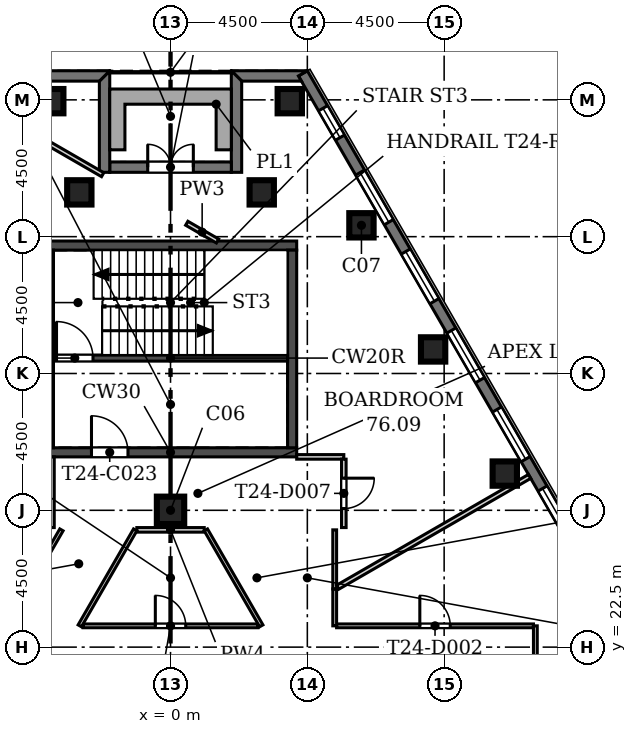
"""IFC4 building model, lengths in metres.
Left out: names, types, materials, properties, quantities, classifications, styles, units other than length and angle.
Written with IfcOpenShell. Run it as: python <this file> out.ifc"""

import sys

from ifc_helpers import new_model, si_unit, direction, frame, frame_2d, origin, origin_2d, place, context, subcontext, project, spatial, polyline, rectangle, outline, extrude, element, fill, save


model = new_model("IFC4")
c1 = context("Model", 3, precision=1e-05, world=origin(), true_north=direction((0.0, 1.0)))
c2 = subcontext(c1, "Body", "Model", "MODEL_VIEW")
j1 = project(units=[si_unit("LENGTHUNIT", "METRE"), si_unit("PLANEANGLEUNIT", "RADIAN")], contexts=[c1])
p1 = place(None, origin())
s1 = spatial("IfcSite", under=j1, at=p1, CompositionType="ELEMENT")
p2 = place(p1, origin())
s2 = spatial("IfcBuilding", under=s1, at=p2, CompositionType="ELEMENT")
p3 = place(p2, frame((0.0, 0.0, 335.1)))
s3 = spatial("IfcBuildingStorey", under=s2, at=p3, CompositionType="ELEMENT", Elevation=335.1)
for number, where, z_axis, x_axis in (
    (1, (10.994, 28.208, 0.0), (0.0, 0.0, 1.0), (1.0, 0.0, 0.0)),
    (2, (8.637, 32.291, 0.0), (0.0, 0.0, 1.0), (1.0, 0.0, 0.0)),
    (3, (6.28, 36.374, 0.0), (0.0, 0.0, 1.0), (1.0, 0.0, 0.0)),
    (4, (3.923, 40.457, 0.0), (0.0, 0.0, 1.0), (1.0, 0.0, 0.0)),
    (5, (3.0, 37.457, 0.0), (0.0, 0.0, 1.0), (1.0, 0.0, 0.0)),
    (6, (-3.0, 37.457, 0.0), (0.0, 0.0, 1.0), (1.0, 0.0, 0.0)),
    (7, (-3.923, 40.457, 0.0), (0.0, 0.0, 1.0), (1.0, 0.0, 0.0)),
):
    element("IfcColumn", number, at=place(p3, frame(where, z_axis=z_axis, x_axis=x_axis)), inside=s3, PredefinedType="COLUMN", context=c2, shape_type="SweptSolid", body=[
        extrude(rectangle(XDim=0.8, YDim=0.8, at=origin_2d()), origin(), (0.0, 0.0, 1.0), 4.2),
    ])
p4 = place(p3, frame((0.0, 27.0, 0.0), z_axis=(0.0, 0.0, 1.0), x_axis=(1.0, 0.0, 0.0)))
e8 = element("IfcColumn", 8, at=p4, inside=s3, PredefinedType="COLUMN", context=c2, shape_type="SweptSolid", body=[
    extrude(rectangle(XDim=0.9, YDim=0.9, at=origin_2d()), origin(), (0.0, 0.0, 1.0), 4.2),
])
p5 = place(p3, frame((23.788, 7.709, 0.0), z_axis=(0.0, 0.0, 1.0), x_axis=(-0.500001731347, 0.866024404189, 0.0)))
e9 = element("IfcWall", 9, at=p5, inside=s3, PredefinedType="SOLIDWALL", context=c2, shape_type="SweptSolid", body=[
    extrude(rectangle(XDim=38.87, YDim=0.34, at=frame_2d((19.435, 0.0))), origin(), (0.0, 0.0, 1.0), 3.8),
])
p6 = place(p5, frame((3.218, 0.0, 0.9)))
e10 = element("IfcOpeningElement", 10, at=p6, cuts=e9, PredefinedType="OPENING", context=c2, shape_type="SweptSolid", body=[
    extrude(rectangle(XDim=1.885, YDim=2.6, at=frame_2d((0.942, 1.3))), frame((0.0, 0.18, 0.0), z_axis=(0.0, -1.0, 0.0), x_axis=(1.0, 0.0, 0.0)), (0.0, 0.0, 1.0), 0.36),
])
p7 = place(p5, frame((6.218, 0.0, 0.9)))
e11 = element("IfcOpeningElement", 11, at=p7, cuts=e9, PredefinedType="OPENING", context=c2, shape_type="SweptSolid", body=[
    extrude(rectangle(XDim=1.885, YDim=2.6, at=frame_2d((0.942, 1.3))), frame((0.0, 0.18, 0.0), z_axis=(0.0, -1.0, 0.0), x_axis=(1.0, 0.0, 0.0)), (0.0, 0.0, 1.0), 0.36),
])
p8 = place(p5, frame((9.218, 0.0, 0.9)))
e12 = element("IfcOpeningElement", 12, at=p8, cuts=e9, PredefinedType="OPENING", context=c2, shape_type="SweptSolid", body=[
    extrude(rectangle(XDim=1.885, YDim=2.6, at=frame_2d((0.942, 1.3))), frame((0.0, 0.18, 0.0), z_axis=(0.0, -1.0, 0.0), x_axis=(1.0, 0.0, 0.0)), (0.0, 0.0, 1.0), 0.36),
])
p9 = place(p5, frame((12.218, 0.0, 0.9)))
e13 = element("IfcOpeningElement", 13, at=p9, cuts=e9, PredefinedType="OPENING", context=c2, shape_type="SweptSolid", body=[
    extrude(rectangle(XDim=1.885, YDim=2.6, at=frame_2d((0.942, 1.3))), frame((0.0, 0.18, 0.0), z_axis=(0.0, -1.0, 0.0), x_axis=(1.0, 0.0, 0.0)), (0.0, 0.0, 1.0), 0.36),
])
p10 = place(p5, frame((15.218, 0.0, 0.9)))
e14 = element("IfcOpeningElement", 14, at=p10, cuts=e9, PredefinedType="OPENING", context=c2, shape_type="SweptSolid", body=[
    extrude(rectangle(XDim=1.885, YDim=2.6, at=frame_2d((0.942, 1.3))), frame((0.0, 0.18, 0.0), z_axis=(0.0, -1.0, 0.0), x_axis=(1.0, 0.0, 0.0)), (0.0, 0.0, 1.0), 0.36),
])
p11 = place(p5, frame((18.218, 0.0, 0.9)))
e15 = element("IfcOpeningElement", 15, at=p11, cuts=e9, PredefinedType="OPENING", context=c2, shape_type="SweptSolid", body=[
    extrude(rectangle(XDim=1.885, YDim=2.6, at=frame_2d((0.942, 1.3))), frame((0.0, 0.18, 0.0), z_axis=(0.0, -1.0, 0.0), x_axis=(1.0, 0.0, 0.0)), (0.0, 0.0, 1.0), 0.36),
])
p12 = place(p5, frame((21.218, 0.0, 0.9)))
e16 = element("IfcOpeningElement", 16, at=p12, cuts=e9, PredefinedType="OPENING", context=c2, shape_type="SweptSolid", body=[
    extrude(rectangle(XDim=1.885, YDim=2.6, at=frame_2d((0.942, 1.3))), frame((0.0, 0.18, 0.0), z_axis=(0.0, -1.0, 0.0), x_axis=(1.0, 0.0, 0.0)), (0.0, 0.0, 1.0), 0.36),
])
p13 = place(p5, frame((24.218, 0.0, 0.9)))
e17 = element("IfcOpeningElement", 17, at=p13, cuts=e9, PredefinedType="OPENING", context=c2, shape_type="SweptSolid", body=[
    extrude(rectangle(XDim=1.885, YDim=2.6, at=frame_2d((0.942, 1.3))), frame((0.0, 0.18, 0.0), z_axis=(0.0, -1.0, 0.0), x_axis=(1.0, 0.0, 0.0)), (0.0, 0.0, 1.0), 0.36),
])
p14 = place(p5, frame((27.218, 0.0, 0.9)))
e18 = element("IfcOpeningElement", 18, at=p14, cuts=e9, PredefinedType="OPENING", context=c2, shape_type="SweptSolid", body=[
    extrude(rectangle(XDim=1.885, YDim=2.6, at=frame_2d((0.942, 1.3))), frame((0.0, 0.18, 0.0), z_axis=(0.0, -1.0, 0.0), x_axis=(1.0, 0.0, 0.0)), (0.0, 0.0, 1.0), 0.36),
])
p15 = place(p5, frame((30.218, 0.0, 0.9)))
e19 = element("IfcOpeningElement", 19, at=p15, cuts=e9, PredefinedType="OPENING", context=c2, shape_type="SweptSolid", body=[
    extrude(rectangle(XDim=1.885, YDim=2.6, at=frame_2d((0.942, 1.3))), frame((0.0, 0.18, 0.0), z_axis=(0.0, -1.0, 0.0), x_axis=(1.0, 0.0, 0.0)), (0.0, 0.0, 1.0), 0.36),
])
p16 = place(p5, frame((33.218, 0.0, 0.9)))
e20 = element("IfcOpeningElement", 20, at=p16, cuts=e9, PredefinedType="OPENING", context=c2, shape_type="SweptSolid", body=[
    extrude(rectangle(XDim=1.885, YDim=2.6, at=frame_2d((0.942, 1.3))), frame((0.0, 0.18, 0.0), z_axis=(0.0, -1.0, 0.0), x_axis=(1.0, 0.0, 0.0)), (0.0, 0.0, 1.0), 0.36),
])
p17 = place(p5, frame((1.051, 0.0, 0.9)))
e21 = element("IfcOpeningElement", 21, at=p17, cuts=e9, PredefinedType="OPENING", context=c2, shape_type="SweptSolid", body=[
    extrude(rectangle(XDim=1.115, YDim=2.4, at=frame_2d((0.558, 1.2))), frame((0.0, 0.18, 0.0), z_axis=(0.0, -1.0, 0.0), x_axis=(1.0, 0.0, 0.0)), (0.0, 0.0, 1.0), 0.36),
])
p18 = place(p5, frame((36.429, 0.0, 0.9)))
e22 = element("IfcOpeningElement", 22, at=p18, cuts=e9, PredefinedType="OPENING", context=c2, shape_type="SweptSolid", body=[
    extrude(rectangle(XDim=1.115, YDim=2.4, at=frame_2d((0.558, 1.2))), frame((0.0, 0.18, 0.0), z_axis=(0.0, -1.0, 0.0), x_axis=(1.0, 0.0, 0.0)), (0.0, 0.0, 1.0), 0.36),
])
p19 = place(p3, origin())
e23 = element("IfcWall", 23, at=p19, inside=s3, PredefinedType="SOLIDWALL", context=c2, shape_type="SweptSolid", body=[
    extrude(outline(polyline([(1.999, 41.457), (4.501, 41.457), (4.501, 41.457), (4.206, 41.286), (4.305, 41.116), (2.34, 41.116), (1.999, 41.457), (1.999, 41.457)])), origin(), (0.0, 0.0, 1.0), 3.8),
])
p20 = place(p3, origin())
e24 = element("IfcWall", 24, at=p20, inside=s3, PredefinedType="SOLIDWALL", context=c2, shape_type="SweptSolid", body=[
    extrude(outline(polyline([(2.341, 38.116), (2.0, 38.116), (2.0, 41.458), (2.0, 41.458), (2.341, 41.117), (2.341, 38.116)])), origin(), (0.0, 0.0, 1.0), 3.8),
])
p21 = place(p3, frame((2.0, 38.287, 0.0), z_axis=(0.0, 0.0, 1.0), x_axis=(-1.0, 0.0, 0.0)))
e25 = element("IfcWall", 25, at=p21, inside=s3, PredefinedType="SOLIDWALL", context=c2, shape_type="SweptSolid", body=[
    extrude(rectangle(XDim=4.0, YDim=0.34, at=frame_2d((2.0, 0.0))), origin(), (0.0, 0.0, 1.0), 3.8),
])
p22 = place(p21, frame((1.25, 0.0, 0.0)))
e26 = element("IfcOpeningElement", 26, at=p22, cuts=e25, PredefinedType="OPENING", context=c2, shape_type="SweptSolid", body=[
    extrude(rectangle(XDim=1.5, YDim=2.4, at=frame_2d((0.75, 1.2))), frame((0.0, 0.18, 0.0), z_axis=(0.0, -1.0, 0.0), x_axis=(1.0, 0.0, 0.0)), (0.0, 0.0, 1.0), 0.36),
])
p23 = place(p3, origin())
e27 = element("IfcWall", 27, at=p23, inside=s3, PredefinedType="SOLIDWALL", context=c2, shape_type="SweptSolid", body=[
    extrude(outline(polyline([(-2.0, 41.458), (-2.0, 38.116), (-2.341, 38.116), (-2.341, 41.117), (-2.0, 41.458), (-2.0, 41.458)])), origin(), (0.0, 0.0, 1.0), 3.8),
])
p24 = place(p3, origin())
e28 = element("IfcWall", 28, at=p24, inside=s3, PredefinedType="SOLIDWALL", context=c2, shape_type="SweptSolid", body=[
    extrude(outline(polyline([(-4.305, 41.116), (-4.206, 41.286), (-4.501, 41.457), (-4.501, 41.457), (-1.999, 41.457), (-1.999, 41.457), (-2.34, 41.116), (-4.305, 41.116)])), origin(), (0.0, 0.0, 1.0), 3.8),
])
p25 = place(p3, origin())
e29 = element("IfcWall", 29, at=p25, inside=s3, PredefinedType="USERDEFINED", context=c2, shape_type="SweptSolid", body=[
    extrude(outline(polyline([(-1.5, 40.857), (-2.0, 40.857), (-2.0, 40.357), (-2.0, 38.857), (-1.5, 38.857), (-1.5, 40.357), (1.5, 40.357), (1.5, 38.857), (2.0, 38.857), (2.0, 40.357), (2.0, 40.857), (1.5, 40.857), (-1.5, 40.857)])), origin(), (0.0, 0.0, 1.0), 1.1),
])
p26 = place(p3, frame((-4.15, 28.907, -0.4), z_axis=(0.0, 0.0, 1.0), x_axis=(1.0, 0.0, 0.0)))
e30 = element("IfcWall", 30, at=p26, inside=s3, PredefinedType="SOLIDWALL", context=c2, shape_type="SweptSolid", body=[
    extrude(rectangle(XDim=8.3, YDim=0.3, at=frame_2d((4.15, 0.0))), origin(), (0.0, 0.0, 1.0), 4.2),
])
p27 = place(p26, frame((1.55, 0.0, 0.4)))
e31 = element("IfcOpeningElement", 31, at=p27, cuts=e30, PredefinedType="OPENING", context=c2, shape_type="SweptSolid", body=[
    extrude(rectangle(XDim=1.2, YDim=2.1, at=frame_2d((0.6, 1.05))), frame((0.0, 0.16, 0.0), z_axis=(0.0, -1.0, 0.0), x_axis=(1.0, 0.0, 0.0)), (0.0, 0.0, 1.0), 0.32),
])
p28 = place(p3, frame((-4.15, 35.707, -0.4), z_axis=(0.0, 0.0, 1.0), x_axis=(1.0, 0.0, 0.0)))
e32 = element("IfcWall", 32, at=p28, inside=s3, PredefinedType="SOLIDWALL", context=c2, shape_type="SweptSolid", body=[
    extrude(rectangle(XDim=8.3, YDim=0.3, at=frame_2d((4.15, 0.0))), origin(), (0.0, 0.0, 1.0), 4.2),
])
for number, where, z_axis, x_axis in (
    (33, (-4.0, 29.057, -0.4), (0.0, 0.0, 1.0), (0.0, 1.0, 0.0)),
    (34, (4.0, 29.057, -0.4), (0.0, 0.0, 1.0), (0.0, 1.0, 0.0)),
):
    element("IfcWall", number, at=place(p3, frame(where, z_axis=z_axis, x_axis=x_axis)), inside=s3, PredefinedType="SOLIDWALL", context=c2, shape_type="SweptSolid", body=[
        extrude(rectangle(XDim=6.5, YDim=0.3, at=frame_2d((3.25, 0.0))), origin(), (0.0, 0.0, 1.0), 4.2),
    ])
p29 = place(p3, frame((-3.85, 32.007, -0.4), z_axis=(0.0, 0.0, 1.0), x_axis=(1.0, 0.0, 0.0)))
e35 = element("IfcWall", 35, at=p29, inside=s3, PredefinedType="SOLIDWALL", context=c2, shape_type="SweptSolid", body=[
    extrude(rectangle(XDim=7.7, YDim=0.2, at=frame_2d((3.85, 0.0))), origin(), (0.0, 0.0, 1.0), 4.2),
])
p30 = place(p29, frame((0.1, 0.0, 0.4)))
e36 = element("IfcOpeningElement", 36, at=p30, cuts=e35, PredefinedType="OPENING", context=c2, shape_type="SweptSolid", body=[
    extrude(rectangle(XDim=1.2, YDim=2.1, at=frame_2d((0.6, 1.05))), frame((0.0, 0.11, 0.0), z_axis=(0.0, -1.0, 0.0), x_axis=(1.0, 0.0, 0.0)), (0.0, 0.0, 1.0), 0.22),
])
p31 = place(p3, frame((5.462, 23.2, 0.0), z_axis=(0.0, 0.0, 1.0), x_axis=(1.0, 0.0, 0.0)))
e37 = element("IfcWall", 37, at=p31, inside=s3, PredefinedType="PARTITIONING", context=c2, shape_type="SweptSolid", body=[
    extrude(rectangle(XDim=6.475, YDim=0.125, at=frame_2d((3.238, 0.0))), origin(), (0.0, 0.0, 1.0), 3.8),
])
p32 = place(p31, frame((2.738, 0.0, 0.0)))
e38 = element("IfcOpeningElement", 38, at=p32, cuts=e37, PredefinedType="OPENING", context=c2, shape_type="SweptSolid", body=[
    extrude(rectangle(XDim=1.0, YDim=2.1, at=frame_2d((0.5, 1.05))), frame((0.0, 0.073, 0.0), z_axis=(0.0, -1.0, 0.0), x_axis=(1.0, 0.0, 0.0)), (0.0, 0.0, 1.0), 0.145),
])
p33 = place(p3, frame((12.0, 23.2, 0.0), z_axis=(0.0, 0.0, 1.0), x_axis=(0.0, -1.0, 0.0)))
e39 = element("IfcWall", 39, at=p33, inside=s3, PredefinedType="PARTITIONING", context=c2, shape_type="SweptSolid", body=[
    extrude(rectangle(XDim=4.738, YDim=0.125, at=frame_2d((2.369, 0.0))), origin(), (0.0, 0.0, 1.0), 3.8),
])
p34 = place(p3, frame((-2.877, 23.2, 0.0), z_axis=(0.0, 0.0, 1.0), x_axis=(1.0, 0.0, 0.0)))
e40 = element("IfcWall", 40, at=p34, inside=s3, PredefinedType="PARTITIONING", context=c2, shape_type="SweptSolid", body=[
    extrude(rectangle(XDim=5.753, YDim=0.125, at=frame_2d((2.877, 0.0))), origin(), (0.0, 0.0, 1.0), 3.8),
])
p35 = place(p34, frame((2.377, 0.0, 0.0)))
e41 = element("IfcOpeningElement", 41, at=p35, cuts=e40, PredefinedType="OPENING", context=c2, shape_type="SweptSolid", body=[
    extrude(rectangle(XDim=1.0, YDim=2.1, at=frame_2d((0.5, 1.05))), frame((0.0, 0.073, 0.0), z_axis=(0.0, -1.0, 0.0), x_axis=(1.0, 0.0, 0.0)), (0.0, 0.0, 1.0), 0.145),
])
p36 = place(p3, frame((4.15, 28.757, 0.0), z_axis=(0.0, 0.0, 1.0), x_axis=(1.0, 0.0, 0.0)))
e42 = element("IfcWall", 42, at=p36, inside=s3, PredefinedType="PARTITIONING", context=c2, shape_type="SweptSolid", body=[
    extrude(rectangle(XDim=1.55, YDim=0.15, at=frame_2d((0.775, 0.0))), origin(), (0.0, 0.0, 1.0), 3.8),
])
p37 = place(p3, frame((5.7, 28.682, 0.0), z_axis=(0.0, 0.0, 1.0), x_axis=(0.0, -1.0, 0.0)))
e43 = element("IfcWall", 43, at=p37, inside=s3, PredefinedType="PARTITIONING", context=c2, shape_type="SweptSolid", body=[
    extrude(rectangle(XDim=2.25, YDim=0.15, at=frame_2d((1.125, 0.0))), origin(), (0.0, 0.0, 1.0), 3.8),
])
p38 = place(p37, frame((0.625, 0.0, 0.0)))
e44 = element("IfcOpeningElement", 44, at=p38, cuts=e43, PredefinedType="OPENING", context=c2, shape_type="SweptSolid", body=[
    extrude(rectangle(XDim=1.0, YDim=2.1, at=frame_2d((0.5, 1.05))), frame((0.0, 0.085, 0.0), z_axis=(0.0, -1.0, 0.0), x_axis=(1.0, 0.0, 0.0)), (0.0, 0.0, 1.0), 0.17),
])
p39 = place(p3, frame((1.109, 26.357, 0.0), z_axis=(0.0, 0.0, 1.0), x_axis=(-1.0, 0.0, 0.0)))
e45 = element("IfcWall", 45, at=p39, inside=s3, PredefinedType="PARTITIONING", context=c2, shape_type="SweptSolid", body=[
    extrude(rectangle(XDim=2.218, YDim=0.15, at=frame_2d((1.109, 0.0))), origin(), (0.0, 0.0, 1.0), 3.8),
])
p40 = place(p3, frame((-3.9, 26.432, 0.0), z_axis=(0.0, 0.0, 1.0), x_axis=(0.0, 1.0, 0.0)))
e46 = element("IfcWall", 46, at=p40, inside=s3, PredefinedType="PARTITIONING", context=c2, shape_type="SweptSolid", body=[
    extrude(rectangle(XDim=2.325, YDim=0.15, at=frame_2d((1.163, 0.0))), origin(), (0.0, 0.0, 1.0), 3.8),
])
p41 = place(p3, frame((-1.163, 26.357, 0.0), z_axis=(0.0, 0.0, 1.0), x_axis=(-0.500014248385, -0.866017177319, 0.0)))
e47 = element("IfcWall", 47, at=p41, inside=s3, PredefinedType="PARTITIONING", context=c2, shape_type="SweptSolid", body=[
    extrude(rectangle(XDim=3.646, YDim=0.125, at=frame_2d((1.823, 0.0))), origin(), (0.0, 0.0, 1.0), 3.8),
])
p42 = place(p3, frame((-4.8, 24.258, 0.0), z_axis=(0.0, 0.0, 1.0), x_axis=(0.499995647607, 0.866027916625, 0.0)))
e48 = element("IfcWall", 48, at=p42, inside=s3, PredefinedType="PARTITIONING", context=c2, shape_type="SweptSolid", body=[
    extrude(rectangle(XDim=2.424, YDim=0.125, at=frame_2d((1.212, 0.0))), origin(), (0.0, 0.0, 1.0), 3.8),
])
p43 = place(p42, frame((0.712, 0.0, 0.0)))
e49 = element("IfcOpeningElement", 49, at=p43, cuts=e48, PredefinedType="OPENING", context=c2, shape_type="SweptSolid", body=[
    extrude(rectangle(XDim=1.0, YDim=2.1, at=frame_2d((0.5, 1.05))), frame((0.0, 0.073, 0.0), z_axis=(0.0, -1.0, 0.0), x_axis=(1.0, 0.0, 0.0)), (0.0, 0.0, 1.0), 0.145),
])
p44 = place(p3, frame((2.985, 23.2, 0.0), z_axis=(0.0, 0.0, 1.0), x_axis=(-0.500014248385, 0.866017177319, 0.0)))
e50 = element("IfcWall", 50, at=p44, inside=s3, PredefinedType="PARTITIONING", context=c2, shape_type="SweptSolid", body=[
    extrude(rectangle(XDim=3.646, YDim=0.125, at=frame_2d((1.823, 0.0))), origin(), (0.0, 0.0, 1.0), 3.8),
])
p45 = place(p3, frame((5.4, 24.413, 0.0), z_axis=(0.0, 0.0, 1.0), x_axis=(0.0, -1.0, 0.0)))
e51 = element("IfcWall", 51, at=p45, inside=s3, PredefinedType="PARTITIONING", context=c2, shape_type="SweptSolid", body=[
    extrude(rectangle(XDim=1.213, YDim=0.125, at=frame_2d((0.607, 0.0))), origin(), (0.0, 0.0, 1.0), 3.8),
])
p46 = place(p3, frame((5.4, 26.357, 0.0), z_axis=(0.0, 0.0, 1.0), x_axis=(0.0, -1.0, 0.0)))
e52 = element("IfcWall", 52, at=p46, inside=s3, PredefinedType="PARTITIONING", context=c2, shape_type="SweptSolid", body=[
    extrude(rectangle(XDim=1.944, YDim=0.125, at=frame_2d((0.972, 0.0))), origin(), (0.0, 0.0, 1.0), 3.8),
])
p47 = place(p3, frame((5.5, 24.471, 0.0), z_axis=(0.0, 0.0, 1.0), x_axis=(0.866028417731, 0.499994779655, 0.0)))
e53 = element("IfcWall", 53, at=p47, inside=s3, PredefinedType="PARTITIONING", context=c2, shape_type="SweptSolid", body=[
    extrude(rectangle(XDim=6.674, YDim=0.15, at=frame_2d((3.337, 0.0))), origin(), (0.0, 0.0, 1.0), 3.8),
])
p48 = place(p3, frame((11.394, 27.874, 0.0), z_axis=(0.0, 0.0, 1.0), x_axis=(0.865889515344, 0.500235291855, 0.0)))
e54 = element("IfcWall", 54, at=p48, inside=s3, PredefinedType="PARTITIONING", context=c2, shape_type="SweptSolid", body=[
    extrude(rectangle(XDim=0.481, YDim=0.15, at=frame_2d((0.24, 0.0))), origin(), (0.0, 0.0, 1.0), 3.8),
])
p49 = place(p3, frame((1.546, 35.857, 0.0), z_axis=(0.0, 0.0, 1.0), x_axis=(-0.86601174498, 0.500023656998, 0.0)))
e55 = element("IfcWall", 55, at=p49, inside=s3, PredefinedType="PARTITIONING", context=c2, shape_type="SweptSolid", body=[
    extrude(rectangle(XDim=1.169, YDim=0.15, at=frame_2d((0.585, 0.0))), origin(), (0.0, 0.0, 1.0), 3.8),
])
p50 = place(p3, frame((-2.232, 38.038, 0.0), z_axis=(0.0, 0.0, 1.0), x_axis=(-0.865994042453, 0.500054315485, 0.0)))
e56 = element("IfcWall", 56, at=p50, inside=s3, PredefinedType="PARTITIONING", context=c2, shape_type="SweptSolid", body=[
    extrude(rectangle(XDim=2.314, YDim=0.15, at=frame_2d((1.157, 0.0))), origin(), (0.0, 0.0, 1.0), 3.8),
])
p51 = place(p12, origin())
e57 = element("IfcWindow", 57, at=p51, inside=s3, PartitioningType="SINGLE_PANEL", PredefinedType="WINDOW", context=c2, shape_type="SweptSolid", body=[
    extrude(rectangle(XDim=1.885, YDim=2.6, at=frame_2d((0.942, 1.3))), frame((0.0, 0.11, 0.0), z_axis=(0.0, -1.0, 0.0), x_axis=(1.0, 0.0, 0.0)), (0.0, 0.0, 1.0), 0.06),
])
fill(e16, e57)
p52 = place(p13, origin())
e58 = element("IfcWindow", 58, at=p52, inside=s3, PartitioningType="SINGLE_PANEL", PredefinedType="WINDOW", context=c2, shape_type="SweptSolid", body=[
    extrude(rectangle(XDim=1.885, YDim=2.6, at=frame_2d((0.942, 1.3))), frame((0.0, 0.11, 0.0), z_axis=(0.0, -1.0, 0.0), x_axis=(1.0, 0.0, 0.0)), (0.0, 0.0, 1.0), 0.06),
])
fill(e17, e58)
p53 = place(p14, origin())
e59 = element("IfcWindow", 59, at=p53, inside=s3, PartitioningType="SINGLE_PANEL", PredefinedType="WINDOW", context=c2, shape_type="SweptSolid", body=[
    extrude(rectangle(XDim=1.885, YDim=2.6, at=frame_2d((0.942, 1.3))), frame((0.0, 0.11, 0.0), z_axis=(0.0, -1.0, 0.0), x_axis=(1.0, 0.0, 0.0)), (0.0, 0.0, 1.0), 0.06),
])
fill(e18, e59)
p54 = place(p15, origin())
e60 = element("IfcWindow", 60, at=p54, inside=s3, PartitioningType="SINGLE_PANEL", PredefinedType="WINDOW", context=c2, shape_type="SweptSolid", body=[
    extrude(rectangle(XDim=1.885, YDim=2.6, at=frame_2d((0.942, 1.3))), frame((0.0, 0.11, 0.0), z_axis=(0.0, -1.0, 0.0), x_axis=(1.0, 0.0, 0.0)), (0.0, 0.0, 1.0), 0.06),
])
fill(e19, e60)
p55 = place(p16, origin())
e61 = element("IfcWindow", 61, at=p55, inside=s3, PartitioningType="SINGLE_PANEL", PredefinedType="WINDOW", context=c2, shape_type="SweptSolid", body=[
    extrude(rectangle(XDim=1.885, YDim=2.6, at=frame_2d((0.942, 1.3))), frame((0.0, 0.11, 0.0), z_axis=(0.0, -1.0, 0.0), x_axis=(1.0, 0.0, 0.0)), (0.0, 0.0, 1.0), 0.06),
])
fill(e20, e61)
p56 = place(p18, origin())
e62 = element("IfcWindow", 62, at=p56, inside=s3, PartitioningType="SINGLE_PANEL", PredefinedType="WINDOW", context=c2, shape_type="SweptSolid", body=[
    extrude(rectangle(XDim=1.115, YDim=2.4, at=frame_2d((0.558, 1.2))), frame((0.0, 0.11, 0.0), z_axis=(0.0, -1.0, 0.0), x_axis=(1.0, 0.0, 0.0)), (0.0, 0.0, 1.0), 0.06),
])
fill(e22, e62)
p57 = place(p22, frame((1.5, 0.0, 0.0), z_axis=(0.0, 0.0, 1.0), x_axis=(-1.0, 0.0, 0.0)))
e63 = element("IfcDoor", 63, at=p57, inside=s3, OperationType="DOUBLE_DOOR_SINGLE_SWING", PredefinedType="DOOR", context=c2, shape_type="SweptSolid", body=[
    extrude(rectangle(XDim=1.5, YDim=2.4, at=frame_2d((0.75, 1.2))), frame((0.0, 0.025, 0.0), z_axis=(0.0, -1.0, 0.0), x_axis=(1.0, 0.0, 0.0)), (0.0, 0.0, 1.0), 0.05),
])
fill(e26, e63)
p58 = place(p27, origin())
e64 = element("IfcDoor", 64, at=p58, inside=s3, OperationType="SINGLE_SWING_LEFT", PredefinedType="DOOR", context=c2, shape_type="SweptSolid", body=[
    extrude(rectangle(XDim=1.2, YDim=2.1, at=frame_2d((0.6, 1.05))), frame((0.0, 0.025, 0.0), z_axis=(0.0, -1.0, 0.0), x_axis=(1.0, 0.0, 0.0)), (0.0, 0.0, 1.0), 0.05),
])
fill(e31, e64)
p59 = place(p30, origin())
e65 = element("IfcDoor", 65, at=p59, inside=s3, OperationType="SINGLE_SWING_LEFT", PredefinedType="DOOR", context=c2, shape_type="SweptSolid", body=[
    extrude(rectangle(XDim=1.2, YDim=2.1, at=frame_2d((0.6, 1.05))), frame((0.0, 0.025, 0.0), z_axis=(0.0, -1.0, 0.0), x_axis=(1.0, 0.0, 0.0)), (0.0, 0.0, 1.0), 0.05),
])
fill(e36, e65)
p60 = place(p32, origin())
e66 = element("IfcDoor", 66, at=p60, inside=s3, OperationType="SINGLE_SWING_LEFT", PredefinedType="DOOR", context=c2, shape_type="SweptSolid", body=[
    extrude(rectangle(XDim=1.0, YDim=2.1, at=frame_2d((0.5, 1.05))), frame((0.0, 0.025, 0.0), z_axis=(0.0, -1.0, 0.0), x_axis=(1.0, 0.0, 0.0)), (0.0, 0.0, 1.0), 0.05),
])
fill(e38, e66)
p61 = place(p35, origin())
e67 = element("IfcDoor", 67, at=p61, inside=s3, OperationType="SINGLE_SWING_LEFT", PredefinedType="DOOR", context=c2, shape_type="SweptSolid", body=[
    extrude(rectangle(XDim=1.0, YDim=2.1, at=frame_2d((0.5, 1.05))), frame((0.0, 0.025, 0.0), z_axis=(0.0, -1.0, 0.0), x_axis=(1.0, 0.0, 0.0)), (0.0, 0.0, 1.0), 0.05),
])
fill(e41, e67)
p62 = place(p38, origin())
e68 = element("IfcDoor", 68, at=p62, inside=s3, OperationType="SINGLE_SWING_LEFT", PredefinedType="DOOR", context=c2, shape_type="SweptSolid", body=[
    extrude(rectangle(XDim=1.0, YDim=2.1, at=frame_2d((0.5, 1.05))), frame((0.0, 0.025, 0.0), z_axis=(0.0, -1.0, 0.0), x_axis=(1.0, 0.0, 0.0)), (0.0, 0.0, 1.0), 0.05),
])
fill(e44, e68)
save(model, sys.argv[1])
